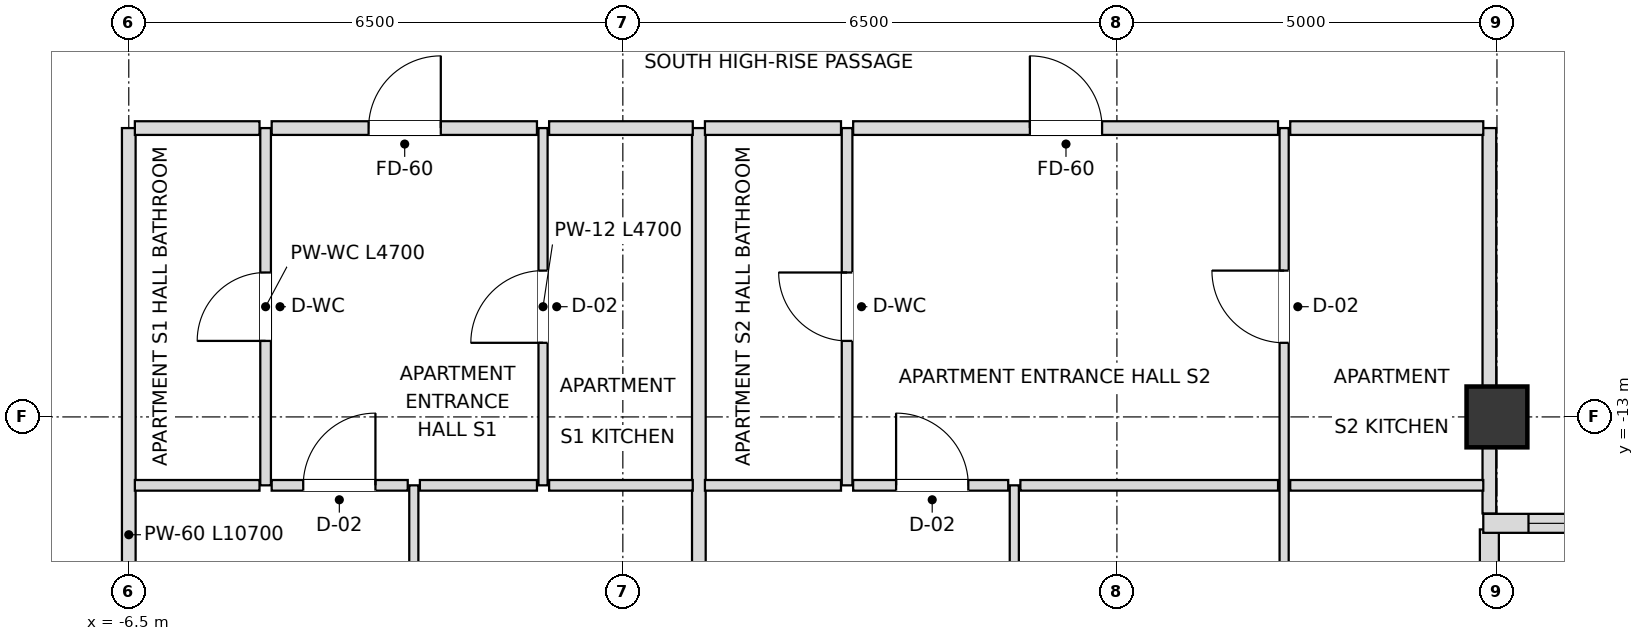
"""IFC4 building model, lengths in metres.
Left out: names, types, materials, properties, quantities, classifications, styles, units other than length and angle.
Written with IfcOpenShell. Run it as: python <this file> out.ifc"""

import sys

from ifc_helpers import new_model, si_unit, direction, frame, frame_2d, origin, origin_2d, place, context, subcontext, project, spatial, rectangle, extrude, element, fill, save


model = new_model("IFC4")
c1 = context("Model", 3, precision=1e-05, world=origin(), true_north=direction((0.0, 1.0)))
c2 = subcontext(c1, "Body", "Model", "MODEL_VIEW")
j1 = project(units=[si_unit("LENGTHUNIT", "METRE"), si_unit("PLANEANGLEUNIT", "RADIAN")], contexts=[c1])
p1 = place(None, origin())
s1 = spatial("IfcSite", under=j1, at=p1, CompositionType="ELEMENT")
p2 = place(p1, origin())
s2 = spatial("IfcBuilding", under=s1, at=p2, CompositionType="ELEMENT")
p3 = place(p2, frame((0.0, 0.0, 297.9)))
s3 = spatial("IfcBuildingStorey", under=s2, at=p3, CompositionType="ELEMENT", Elevation=297.9)
p4 = place(p3, frame((11.5, -13.0, 0.0), z_axis=(0.0, 0.0, 1.0), x_axis=(1.0, 0.0, 0.0)))
e1 = element("IfcColumn", 1, at=p4, inside=s3, PredefinedType="COLUMN", context=c2, shape_type="SweptSolid", body=[
    extrude(rectangle(XDim=0.8, YDim=0.8, at=origin_2d()), origin(), (0.0, 0.0, 1.0), 3.6),
])
p5 = place(p3, frame((11.4, -19.82, 0.0), z_axis=(0.0, 0.0, 1.0), x_axis=(0.0, 1.0, 0.0)))
e2 = element("IfcWall", 2, at=p5, inside=s3, PredefinedType="SOLIDWALL", context=c2, shape_type="SweptSolid", body=[
    extrude(rectangle(XDim=5.34, YDim=0.25, at=frame_2d((2.67, 0.0))), origin(), (0.0, 0.0, 1.0), 2.748),
])
p6 = place(p5, frame((1.925, 0.0, 0.72)))
e3 = element("IfcOpeningElement", 3, at=p6, cuts=e2, PredefinedType="OPENING", context=c2, shape_type="SweptSolid", body=[
    extrude(rectangle(XDim=1.8, YDim=1.68, at=frame_2d((0.9, 0.84))), frame((0.0, 0.135, 0.0), z_axis=(0.0, -1.0, 0.0), x_axis=(1.0, 0.0, 0.0)), (0.0, 0.0, 1.0), 0.27),
])
p7 = place(p3, frame((11.32, -14.4, 0.0), z_axis=(0.0, 0.0, 1.0), x_axis=(1.0, 0.0, 0.0)))
e4 = element("IfcWall", 4, at=p7, inside=s3, PredefinedType="SOLIDWALL", context=c2, shape_type="SweptSolid", body=[
    extrude(rectangle(XDim=5.66, YDim=0.25, at=frame_2d((2.83, 0.0))), origin(), (0.0, 0.0, 1.0), 2.748),
])
p8 = place(p7, frame((0.595, 0.0, 0.72)))
e5 = element("IfcOpeningElement", 5, at=p8, cuts=e4, PredefinedType="OPENING", context=c2, shape_type="SweptSolid", body=[
    extrude(rectangle(XDim=1.8, YDim=1.68, at=frame_2d((0.9, 0.84))), frame((0.0, 0.135, 0.0), z_axis=(0.0, -1.0, 0.0), x_axis=(1.0, 0.0, 0.0)), (0.0, 0.0, 1.0), 0.27),
])
p9 = place(p7, frame((3.265, 0.0, 0.72)))
e6 = element("IfcOpeningElement", 6, at=p9, cuts=e4, PredefinedType="OPENING", context=c2, shape_type="SweptSolid", body=[
    extrude(rectangle(XDim=1.8, YDim=1.68, at=frame_2d((0.9, 0.84))), frame((0.0, 0.135, 0.0), z_axis=(0.0, -1.0, 0.0), x_axis=(1.0, 0.0, 0.0)), (0.0, 0.0, 1.0), 0.27),
])
p10 = place(p3, frame((-6.5, -19.9, 0.0), z_axis=(0.0, 0.0, 1.0), x_axis=(0.0, 1.0, 0.0)))
e7 = element("IfcWall", 7, at=p10, inside=s3, PredefinedType="PARTITIONING", context=c2, shape_type="SweptSolid", body=[
    extrude(rectangle(XDim=10.7, YDim=0.18, at=frame_2d((5.35, 0.0))), origin(), (0.0, 0.0, 1.0), 2.826),
])
p11 = place(p3, frame((-4.7, -13.9, 0.0), z_axis=(0.0, 0.0, 1.0), x_axis=(0.0, 1.0, 0.0)))
e8 = element("IfcWall", 8, at=p11, inside=s3, PredefinedType="PARTITIONING", context=c2, shape_type="SweptSolid", body=[
    extrude(rectangle(XDim=4.7, YDim=0.14, at=frame_2d((2.35, 0.0))), origin(), (0.0, 0.0, 1.0), 3.38),
])
p12 = place(p11, frame((1.9, 0.0, 0.0)))
e9 = element("IfcOpeningElement", 9, at=p12, cuts=e8, PredefinedType="OPENING", context=c2, shape_type="SweptSolid", body=[
    extrude(rectangle(XDim=0.9, YDim=2.1, at=frame_2d((0.45, 1.05))), frame((0.0, 0.08, 0.0), z_axis=(0.0, -1.0, 0.0), x_axis=(1.0, 0.0, 0.0)), (0.0, 0.0, 1.0), 0.16),
])
p13 = place(p3, frame((-2.75, -19.9, 0.0), z_axis=(0.0, 0.0, 1.0), x_axis=(0.0, 1.0, 0.0)))
e10 = element("IfcWall", 10, at=p13, inside=s3, PredefinedType="PARTITIONING", context=c2, shape_type="SweptSolid", body=[
    extrude(rectangle(XDim=6.0, YDim=0.12, at=frame_2d((3.0, 0.0))), origin(), (0.0, 0.0, 1.0), 3.018),
])
p14 = place(p13, frame((2.55, 0.0, 0.0)))
e11 = element("IfcOpeningElement", 11, at=p14, cuts=e10, PredefinedType="OPENING", context=c2, shape_type="SweptSolid", body=[
    extrude(rectangle(XDim=0.9, YDim=2.1, at=frame_2d((0.45, 1.05))), frame((0.0, 0.07, 0.0), z_axis=(0.0, -1.0, 0.0), x_axis=(1.0, 0.0, 0.0)), (0.0, 0.0, 1.0), 0.14),
])
p15 = place(p3, frame((-1.05, -13.9, 0.0), z_axis=(0.0, 0.0, 1.0), x_axis=(0.0, 1.0, 0.0)))
e12 = element("IfcWall", 12, at=p15, inside=s3, PredefinedType="PARTITIONING", context=c2, shape_type="SweptSolid", body=[
    extrude(rectangle(XDim=4.7, YDim=0.12, at=frame_2d((2.35, 0.0))), origin(), (0.0, 0.0, 1.0), 3.38),
])
p16 = place(p15, frame((1.875, 0.0, 0.0)))
e13 = element("IfcOpeningElement", 13, at=p16, cuts=e12, PredefinedType="OPENING", context=c2, shape_type="SweptSolid", body=[
    extrude(rectangle(XDim=0.95, YDim=2.1, at=frame_2d((0.475, 1.05))), frame((0.0, 0.07, 0.0), z_axis=(0.0, -1.0, 0.0), x_axis=(1.0, 0.0, 0.0)), (0.0, 0.0, 1.0), 0.14),
])
p17 = place(p3, frame((1.0, -19.9, 0.0), z_axis=(0.0, 0.0, 1.0), x_axis=(0.0, 1.0, 0.0)))
e14 = element("IfcWall", 14, at=p17, inside=s3, PredefinedType="PARTITIONING", context=c2, shape_type="SweptSolid", body=[
    extrude(rectangle(XDim=10.7, YDim=0.18, at=frame_2d((5.35, 0.0))), origin(), (0.0, 0.0, 1.0), 3.018),
])
p18 = place(p3, frame((2.95, -13.9, 0.0), z_axis=(0.0, 0.0, 1.0), x_axis=(0.0, 1.0, 0.0)))
e15 = element("IfcWall", 15, at=p18, inside=s3, PredefinedType="PARTITIONING", context=c2, shape_type="SweptSolid", body=[
    extrude(rectangle(XDim=4.7, YDim=0.14, at=frame_2d((2.35, 0.0))), origin(), (0.0, 0.0, 1.0), 3.38),
])
p19 = place(p18, frame((1.9, 0.0, 0.0)))
e16 = element("IfcOpeningElement", 16, at=p19, cuts=e15, PredefinedType="OPENING", context=c2, shape_type="SweptSolid", body=[
    extrude(rectangle(XDim=0.9, YDim=2.1, at=frame_2d((0.45, 1.05))), frame((0.0, 0.08, 0.0), z_axis=(0.0, -1.0, 0.0), x_axis=(1.0, 0.0, 0.0)), (0.0, 0.0, 1.0), 0.16),
])
p20 = place(p3, frame((5.15, -19.9, 0.0), z_axis=(0.0, 0.0, 1.0), x_axis=(0.0, 1.0, 0.0)))
e17 = element("IfcWall", 17, at=p20, inside=s3, PredefinedType="PARTITIONING", context=c2, shape_type="SweptSolid", body=[
    extrude(rectangle(XDim=6.0, YDim=0.12, at=frame_2d((3.0, 0.0))), origin(), (0.0, 0.0, 1.0), 3.018),
])
p21 = place(p20, frame((2.55, 0.0, 0.0)))
e18 = element("IfcOpeningElement", 18, at=p21, cuts=e17, PredefinedType="OPENING", context=c2, shape_type="SweptSolid", body=[
    extrude(rectangle(XDim=0.9, YDim=2.1, at=frame_2d((0.45, 1.05))), frame((0.0, 0.07, 0.0), z_axis=(0.0, -1.0, 0.0), x_axis=(1.0, 0.0, 0.0)), (0.0, 0.0, 1.0), 0.14),
])
p22 = place(p3, frame((8.7, -19.9, 0.0), z_axis=(0.0, 0.0, 1.0), x_axis=(0.0, 1.0, 0.0)))
e19 = element("IfcWall", 19, at=p22, inside=s3, PredefinedType="PARTITIONING", context=c2, shape_type="SweptSolid", body=[
    extrude(rectangle(XDim=10.7, YDim=0.12, at=frame_2d((5.35, 0.0))), origin(), (0.0, 0.0, 1.0), 2.826),
])
p23 = place(p22, frame((7.875, 0.0, 0.0)))
e20 = element("IfcOpeningElement", 20, at=p23, cuts=e19, PredefinedType="OPENING", context=c2, shape_type="SweptSolid", body=[
    extrude(rectangle(XDim=0.95, YDim=2.1, at=frame_2d((0.475, 1.05))), frame((0.0, 0.07, 0.0), z_axis=(0.0, -1.0, 0.0), x_axis=(1.0, 0.0, 0.0)), (0.0, 0.0, 1.0), 0.14),
])
p24 = place(p22, frame((2.55, 0.0, 0.0)))
e21 = element("IfcOpeningElement", 21, at=p24, cuts=e19, PredefinedType="OPENING", context=c2, shape_type="SweptSolid", body=[
    extrude(rectangle(XDim=0.9, YDim=2.1, at=frame_2d((0.45, 1.05))), frame((0.0, 0.07, 0.0), z_axis=(0.0, -1.0, 0.0), x_axis=(1.0, 0.0, 0.0)), (0.0, 0.0, 1.0), 0.14),
])
p25 = place(p3, frame((11.4, -14.27, 0.0), z_axis=(0.0, 0.0, 1.0), x_axis=(0.0, 1.0, 0.0)))
e22 = element("IfcWall", 22, at=p25, inside=s3, PredefinedType="PARTITIONING", context=c2, shape_type="SweptSolid", body=[
    extrude(rectangle(XDim=5.07, YDim=0.18, at=frame_2d((2.535, 0.0))), origin(), (0.0, 0.0, 1.0), 2.748),
])
p26 = place(p3, frame((-6.42, -13.9, 0.0), z_axis=(0.0, 0.0, 1.0), x_axis=(1.0, 0.0, 0.0)))
e23 = element("IfcWall", 23, at=p26, inside=s3, PredefinedType="PARTITIONING", context=c2, shape_type="SweptSolid", body=[
    extrude(rectangle(XDim=1.64, YDim=0.14, at=frame_2d((0.82, 0.0))), origin(), (0.0, 0.0, 1.0), 3.38),
])
p27 = place(p3, frame((-4.62, -13.9, 0.0), z_axis=(0.0, 0.0, 1.0), x_axis=(1.0, 0.0, 0.0)))
e24 = element("IfcWall", 24, at=p27, inside=s3, PredefinedType="PARTITIONING", context=c2, shape_type="SweptSolid", body=[
    extrude(rectangle(XDim=1.79, YDim=0.14, at=frame_2d((0.895, 0.0))), origin(), (0.0, 0.0, 1.0), 3.38),
])
p28 = place(p27, frame((0.415, 0.0, 0.0)))
e25 = element("IfcOpeningElement", 25, at=p28, cuts=e24, PredefinedType="OPENING", context=c2, shape_type="SweptSolid", body=[
    extrude(rectangle(XDim=0.95, YDim=2.1, at=frame_2d((0.475, 1.05))), frame((0.0, 0.08, 0.0), z_axis=(0.0, -1.0, 0.0), x_axis=(1.0, 0.0, 0.0)), (0.0, 0.0, 1.0), 0.16),
])
p29 = place(p3, frame((-2.67, -13.9, 0.0), z_axis=(0.0, 0.0, 1.0), x_axis=(1.0, 0.0, 0.0)))
e26 = element("IfcWall", 26, at=p29, inside=s3, PredefinedType="PARTITIONING", context=c2, shape_type="SweptSolid", body=[
    extrude(rectangle(XDim=1.54, YDim=0.14, at=frame_2d((0.77, 0.0))), origin(), (0.0, 0.0, 1.0), 3.38),
])
p30 = place(p3, frame((-0.97, -13.9, 0.0), z_axis=(0.0, 0.0, 1.0), x_axis=(1.0, 0.0, 0.0)))
e27 = element("IfcWall", 27, at=p30, inside=s3, PredefinedType="PARTITIONING", context=c2, shape_type="SweptSolid", body=[
    extrude(rectangle(XDim=1.89, YDim=0.14, at=frame_2d((0.945, 0.0))), origin(), (0.0, 0.0, 1.0), 3.38),
])
p31 = place(p3, frame((1.08, -13.9, 0.0), z_axis=(0.0, 0.0, 1.0), x_axis=(1.0, 0.0, 0.0)))
e28 = element("IfcWall", 28, at=p31, inside=s3, PredefinedType="PARTITIONING", context=c2, shape_type="SweptSolid", body=[
    extrude(rectangle(XDim=1.79, YDim=0.14, at=frame_2d((0.895, 0.0))), origin(), (0.0, 0.0, 1.0), 3.38),
])
p32 = place(p3, frame((3.03, -13.9, 0.0), z_axis=(0.0, 0.0, 1.0), x_axis=(1.0, 0.0, 0.0)))
e29 = element("IfcWall", 29, at=p32, inside=s3, PredefinedType="PARTITIONING", context=c2, shape_type="SweptSolid", body=[
    extrude(rectangle(XDim=2.04, YDim=0.14, at=frame_2d((1.02, 0.0))), origin(), (0.0, 0.0, 1.0), 3.38),
])
p33 = place(p32, frame((0.565, 0.0, 0.0)))
e30 = element("IfcOpeningElement", 30, at=p33, cuts=e29, PredefinedType="OPENING", context=c2, shape_type="SweptSolid", body=[
    extrude(rectangle(XDim=0.95, YDim=2.1, at=frame_2d((0.475, 1.05))), frame((0.0, 0.08, 0.0), z_axis=(0.0, -1.0, 0.0), x_axis=(1.0, 0.0, 0.0)), (0.0, 0.0, 1.0), 0.16),
])
p34 = place(p3, frame((5.23, -13.9, 0.0), z_axis=(0.0, 0.0, 1.0), x_axis=(1.0, 0.0, 0.0)))
e31 = element("IfcWall", 31, at=p34, inside=s3, PredefinedType="PARTITIONING", context=c2, shape_type="SweptSolid", body=[
    extrude(rectangle(XDim=3.39, YDim=0.14, at=frame_2d((1.695, 0.0))), origin(), (0.0, 0.0, 1.0), 2.826),
])
p35 = place(p3, frame((8.78, -13.9, 0.0), z_axis=(0.0, 0.0, 1.0), x_axis=(1.0, 0.0, 0.0)))
e32 = element("IfcWall", 32, at=p35, inside=s3, PredefinedType="PARTITIONING", context=c2, shape_type="SweptSolid", body=[
    extrude(rectangle(XDim=2.54, YDim=0.14, at=frame_2d((1.27, 0.0))), origin(), (0.0, 0.0, 1.0), 3.38),
])
p36 = place(p3, frame((-6.42, -9.2, 0.0), z_axis=(0.0, 0.0, 1.0), x_axis=(1.0, 0.0, 0.0)))
e33 = element("IfcWall", 33, at=p36, inside=s3, PredefinedType="PARTITIONING", context=c2, shape_type="SweptSolid", body=[
    extrude(rectangle(XDim=1.64, YDim=0.18, at=frame_2d((0.82, 0.0))), origin(), (0.0, 0.0, 1.0), 3.38),
])
p37 = place(p3, frame((-4.62, -9.2, 0.0), z_axis=(0.0, 0.0, 1.0), x_axis=(1.0, 0.0, 0.0)))
e34 = element("IfcWall", 34, at=p37, inside=s3, PredefinedType="PARTITIONING", context=c2, shape_type="SweptSolid", body=[
    extrude(rectangle(XDim=3.49, YDim=0.18, at=frame_2d((1.745, 0.0))), origin(), (0.0, 0.0, 1.0), 3.38),
])
p38 = place(p37, frame((1.275, 0.0, 0.0)))
e35 = element("IfcOpeningElement", 35, at=p38, cuts=e34, PredefinedType="OPENING", context=c2, shape_type="SweptSolid", body=[
    extrude(rectangle(XDim=0.95, YDim=2.15, at=frame_2d((0.475, 1.075))), frame((0.0, 0.1, 0.0), z_axis=(0.0, -1.0, 0.0), x_axis=(1.0, 0.0, 0.0)), (0.0, 0.0, 1.0), 0.2),
])
p39 = place(p3, frame((-0.97, -9.2, 0.0), z_axis=(0.0, 0.0, 1.0), x_axis=(1.0, 0.0, 0.0)))
e36 = element("IfcWall", 36, at=p39, inside=s3, PredefinedType="PARTITIONING", context=c2, shape_type="SweptSolid", body=[
    extrude(rectangle(XDim=1.89, YDim=0.18, at=frame_2d((0.945, 0.0))), origin(), (0.0, 0.0, 1.0), 3.38),
])
p40 = place(p3, frame((1.08, -9.2, 0.0), z_axis=(0.0, 0.0, 1.0), x_axis=(1.0, 0.0, 0.0)))
e37 = element("IfcWall", 37, at=p40, inside=s3, PredefinedType="PARTITIONING", context=c2, shape_type="SweptSolid", body=[
    extrude(rectangle(XDim=1.79, YDim=0.18, at=frame_2d((0.895, 0.0))), origin(), (0.0, 0.0, 1.0), 3.38),
])
p41 = place(p3, frame((3.03, -9.2, 0.0), z_axis=(0.0, 0.0, 1.0), x_axis=(1.0, 0.0, 0.0)))
e38 = element("IfcWall", 38, at=p41, inside=s3, PredefinedType="PARTITIONING", context=c2, shape_type="SweptSolid", body=[
    extrude(rectangle(XDim=5.59, YDim=0.18, at=frame_2d((2.795, 0.0))), origin(), (0.0, 0.0, 1.0), 2.826),
])
p42 = place(p41, frame((2.325, 0.0, 0.0)))
e39 = element("IfcOpeningElement", 39, at=p42, cuts=e38, PredefinedType="OPENING", context=c2, shape_type="SweptSolid", body=[
    extrude(rectangle(XDim=0.95, YDim=2.15, at=frame_2d((0.475, 1.075))), frame((0.0, 0.1, 0.0), z_axis=(0.0, -1.0, 0.0), x_axis=(1.0, 0.0, 0.0)), (0.0, 0.0, 1.0), 0.2),
])
p43 = place(p3, frame((8.78, -9.2, 0.0), z_axis=(0.0, 0.0, 1.0), x_axis=(1.0, 0.0, 0.0)))
e40 = element("IfcWall", 40, at=p43, inside=s3, PredefinedType="PARTITIONING", context=c2, shape_type="SweptSolid", body=[
    extrude(rectangle(XDim=2.54, YDim=0.18, at=frame_2d((1.27, 0.0))), origin(), (0.0, 0.0, 1.0), 3.38),
])
p44 = place(p8, origin())
e41 = element("IfcWindow", 41, at=p44, inside=s3, PartitioningType="SINGLE_PANEL", PredefinedType="WINDOW", context=c2, shape_type="SweptSolid", body=[
    extrude(rectangle(XDim=1.8, YDim=1.68, at=frame_2d((0.9, 0.84))), frame((0.0, 0.03, 0.0), z_axis=(0.0, -1.0, 0.0), x_axis=(1.0, 0.0, 0.0)), (0.0, 0.0, 1.0), 0.06),
])
fill(e5, e41)
p45 = place(p12, origin())
e42 = element("IfcDoor", 42, at=p45, inside=s3, OperationType="SINGLE_SWING_LEFT", PredefinedType="DOOR", context=c2, shape_type="SweptSolid", body=[
    extrude(rectangle(XDim=0.9, YDim=2.1, at=frame_2d((0.45, 1.05))), frame((0.0, 0.025, 0.0), z_axis=(0.0, -1.0, 0.0), x_axis=(1.0, 0.0, 0.0)), (0.0, 0.0, 1.0), 0.05),
])
fill(e9, e42)
p46 = place(p38, origin())
e43 = element("IfcDoor", 43, at=p46, inside=s3, OperationType="SINGLE_SWING_RIGHT", PredefinedType="DOOR", context=c2, shape_type="SweptSolid", body=[
    extrude(rectangle(XDim=0.95, YDim=2.15, at=frame_2d((0.475, 1.075))), frame((0.0, 0.025, 0.0), z_axis=(0.0, -1.0, 0.0), x_axis=(1.0, 0.0, 0.0)), (0.0, 0.0, 1.0), 0.05),
])
fill(e35, e43)
p47 = place(p16, origin())
e44 = element("IfcDoor", 44, at=p47, inside=s3, OperationType="SINGLE_SWING_LEFT", PredefinedType="DOOR", context=c2, shape_type="SweptSolid", body=[
    extrude(rectangle(XDim=0.95, YDim=2.1, at=frame_2d((0.475, 1.05))), frame((0.0, 0.025, 0.0), z_axis=(0.0, -1.0, 0.0), x_axis=(1.0, 0.0, 0.0)), (0.0, 0.0, 1.0), 0.05),
])
fill(e13, e44)
p48 = place(p28, origin())
e45 = element("IfcDoor", 45, at=p48, inside=s3, OperationType="SINGLE_SWING_RIGHT", PredefinedType="DOOR", context=c2, shape_type="SweptSolid", body=[
    extrude(rectangle(XDim=0.95, YDim=2.1, at=frame_2d((0.475, 1.05))), frame((0.0, 0.025, 0.0), z_axis=(0.0, -1.0, 0.0), x_axis=(1.0, 0.0, 0.0)), (0.0, 0.0, 1.0), 0.05),
])
fill(e25, e45)
p49 = place(p19, origin())
e46 = element("IfcDoor", 46, at=p49, inside=s3, OperationType="SINGLE_SWING_RIGHT", PredefinedType="DOOR", context=c2, shape_type="SweptSolid", body=[
    extrude(rectangle(XDim=0.9, YDim=2.1, at=frame_2d((0.45, 1.05))), frame((0.0, 0.025, 0.0), z_axis=(0.0, -1.0, 0.0), x_axis=(1.0, 0.0, 0.0)), (0.0, 0.0, 1.0), 0.05),
])
fill(e16, e46)
p50 = place(p42, origin())
e47 = element("IfcDoor", 47, at=p50, inside=s3, OperationType="SINGLE_SWING_LEFT", PredefinedType="DOOR", context=c2, shape_type="SweptSolid", body=[
    extrude(rectangle(XDim=0.95, YDim=2.15, at=frame_2d((0.475, 1.075))), frame((0.0, 0.025, 0.0), z_axis=(0.0, -1.0, 0.0), x_axis=(1.0, 0.0, 0.0)), (0.0, 0.0, 1.0), 0.05),
])
fill(e39, e47)
p51 = place(p23, origin())
e48 = element("IfcDoor", 48, at=p51, inside=s3, OperationType="SINGLE_SWING_RIGHT", PredefinedType="DOOR", context=c2, shape_type="SweptSolid", body=[
    extrude(rectangle(XDim=0.95, YDim=2.1, at=frame_2d((0.475, 1.05))), frame((0.0, 0.025, 0.0), z_axis=(0.0, -1.0, 0.0), x_axis=(1.0, 0.0, 0.0)), (0.0, 0.0, 1.0), 0.05),
])
fill(e20, e48)
p52 = place(p33, origin())
e49 = element("IfcDoor", 49, at=p52, inside=s3, OperationType="SINGLE_SWING_LEFT", PredefinedType="DOOR", context=c2, shape_type="SweptSolid", body=[
    extrude(rectangle(XDim=0.95, YDim=2.1, at=frame_2d((0.475, 1.05))), frame((0.0, 0.025, 0.0), z_axis=(0.0, -1.0, 0.0), x_axis=(1.0, 0.0, 0.0)), (0.0, 0.0, 1.0), 0.05),
])
fill(e30, e49)
save(model, sys.argv[1])
